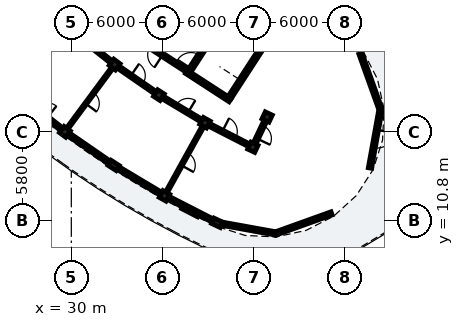
"""IFC4 building model, lengths in metres.
Left out: names, types, materials, properties, quantities, classifications, styles, units other than length and angle.
Written with IfcOpenShell. Run it as: python <this file> out.ifc"""

import sys

from ifc_helpers import new_model, si_unit, direction, frame, frame_2d, origin, origin_2d, place, context, subcontext, project, spatial, rectangle, extrude, element, fill, save


model = new_model("IFC4")
c1 = context("Model", 3, precision=1e-05, world=origin(), true_north=direction((0.0, 1.0)))
c2 = subcontext(c1, "Body", "Model", "MODEL_VIEW")
j1 = project(units=[si_unit("LENGTHUNIT", "METRE"), si_unit("PLANEANGLEUNIT", "RADIAN")], contexts=[c1])
p1 = place(None, origin())
s1 = spatial("IfcSite", under=j1, at=p1, CompositionType="ELEMENT")
p2 = place(p1, origin())
s2 = spatial("IfcBuilding", under=s1, at=p2, CompositionType="ELEMENT")
p3 = place(p2, frame((0.0, 0.0, 35.72)))
s3 = spatial("IfcBuildingStorey", under=s2, at=p3, CompositionType="ELEMENT", Elevation=35.72)
p4 = place(p3, frame((40.413, 18.882, 0.0), z_axis=(0.0, 0.0, 1.0), x_axis=(0.544629435258, 0.838676802022, 0.0)))
e1 = element("IfcWall", 1, at=p4, inside=s3, PredefinedType="SHEAR", context=c2, shape_type="SweptSolid", body=[
    extrude(rectangle(XDim=6.6, YDim=0.25, at=frame_2d((3.3, 0.0))), origin(), (0.0, 0.0, 1.0), 3.11),
])
p5 = place(p3, frame((40.449, 18.709, 0.0), z_axis=(0.0, 0.0, 1.0), x_axis=(-0.838678407117, 0.544626963559, 0.0)))
e2 = element("IfcWall", 2, at=p5, inside=s3, PredefinedType="SHEAR", context=c2, shape_type="SweptSolid", body=[
    extrude(rectangle(XDim=3.42, YDim=0.25, at=frame_2d((1.71, 0.0))), origin(), (0.0, 0.0, 1.0), 3.11),
])
p6 = place(p3, frame((37.754, 20.608, 0.0), z_axis=(0.0, 0.0, 1.0), x_axis=(0.544655453679, 0.838659905312, 0.0)))
e3 = element("IfcWall", 3, at=p6, inside=s3, PredefinedType="SHEAR", context=c2, shape_type="SweptSolid", body=[
    extrude(rectangle(XDim=6.6, YDim=0.25, at=frame_2d((3.3, 0.0))), origin(), (0.0, 0.0, 1.0), 3.11),
])
p7 = place(p6, frame((0.22, 0.0, 0.0)))
e4 = element("IfcOpeningElement", 4, at=p7, cuts=e3, PredefinedType="OPENING", context=c2, shape_type="SweptSolid", body=[
    extrude(rectangle(XDim=1.05, YDim=2.15, at=frame_2d((0.525, 1.075))), frame((0.0, 0.135, 0.0), z_axis=(0.0, -1.0, 0.0), x_axis=(1.0, 0.0, 0.0)), (0.0, 0.0, 1.0), 0.27),
])
for number, where, z_axis, x_axis in (
    (5, (32.85, 21.052, 0.0), (0.0, 0.0, 1.0), (-0.595, -0.804, 0.0)),
    (6, (29.578, 16.63, 0.0), (0.0, 0.0, 1.0), (-0.595, -0.804, 0.0)),
    (7, (35.76, 19.042, 0.0), (0.0, 0.0, 1.0), (-0.541, -0.841, 0.0)),
):
    element("IfcColumn", number, at=place(p3, frame(where, z_axis=z_axis, x_axis=x_axis)), inside=s3, PredefinedType="COLUMN", context=c2, shape_type="SweptSolid", body=[
        extrude(rectangle(XDim=0.51, YDim=0.51, at=origin_2d()), origin(), (0.0, 0.0, 1.0), 3.125),
    ])
p8 = place(p3, frame((32.785, 14.416, 0.0), z_axis=(0.0, 0.0, 1.0), x_axis=(-0.540974471368, -0.841039012964, 0.0)))
e8 = element("IfcColumn", 8, at=p8, inside=s3, PredefinedType="PILASTER", context=c2, shape_type="SweptSolid", body=[
    extrude(rectangle(XDim=0.39, YDim=0.63, at=origin_2d()), origin(), (0.0, 0.0, 1.0), 3.125),
])
for number, where, z_axis, x_axis in (
    (9, (38.796, 17.227, 0.0), (0.0, 0.0, 1.0), (-0.485, -0.875, 0.0)),
    (10, (36.13, 12.417, 0.0), (0.0, 0.0, 1.0), (-0.485, -0.875, 0.0)),
    (11, (42.882, 17.604, 0.0), (0.0, 0.0, 1.0), (-0.427, -0.904, 0.0)),
    (12, (41.944, 15.614, 0.0), (0.0, 0.0, 1.0), (-0.427, -0.904, 0.0)),
):
    element("IfcColumn", number, at=place(p3, frame(where, z_axis=z_axis, x_axis=x_axis)), inside=s3, PredefinedType="COLUMN", context=c2, shape_type="SweptSolid", body=[
        extrude(rectangle(XDim=0.51, YDim=0.51, at=origin_2d()), origin(), (0.0, 0.0, 1.0), 3.125),
    ])
p9 = place(p3, frame((39.598, 10.64, 0.0), z_axis=(0.0, 0.0, 1.0), x_axis=(-0.426568739901, -0.904455145454, 0.0)))
e13 = element("IfcColumn", 13, at=p9, inside=s3, PredefinedType="PILASTER", context=c2, shape_type="SweptSolid", body=[
    extrude(rectangle(XDim=0.39, YDim=0.63, at=origin_2d()), origin(), (0.0, 0.0, 1.0), 3.125),
])
p10 = place(p3, frame((26.653, 18.947, 0.0), z_axis=(0.0, 0.0, 1.0), x_axis=(0.783976646649, -0.620790316861, 0.0)))
e14 = element("IfcWall", 14, at=p10, inside=s3, PredefinedType="SOLIDWALL", context=c2, shape_type="SweptSolid", body=[
    extrude(rectangle(XDim=3.507, YDim=0.22, at=frame_2d((1.753, 0.0))), origin(), (0.0, 0.0, 1.0), 2.355),
])
p11 = place(p10, frame((1.263, 0.0, 0.0)))
e15 = element("IfcOpeningElement", 15, at=p11, cuts=e14, PredefinedType="OPENING", context=c2, shape_type="SweptSolid", body=[
    extrude(rectangle(XDim=0.98, YDim=2.12, at=frame_2d((0.49, 1.06))), frame((0.0, 0.12, 0.0), z_axis=(0.0, -1.0, 0.0), x_axis=(1.0, 0.0, 0.0)), (0.0, 0.0, 1.0), 0.24),
])
p12 = place(p3, frame((29.763, 16.502, 0.0), z_axis=(0.0, 0.0, 1.0), x_axis=(0.822878299875, -0.568217655125, 0.0)))
e16 = element("IfcWall", 16, at=p12, inside=s3, PredefinedType="SOLIDWALL", context=c2, shape_type="SweptSolid", body=[
    extrude(rectangle(XDim=3.507, YDim=0.22, at=frame_2d((1.753, 0.0))), origin(), (0.0, 0.0, 1.0), 2.355),
])
p13 = place(p12, frame((1.213, 0.0, 0.55)))
e17 = element("IfcOpeningElement", 17, at=p13, cuts=e16, PredefinedType="OPENING", context=c2, shape_type="SweptSolid", body=[
    extrude(rectangle(XDim=1.08, YDim=1.45, at=frame_2d((0.54, 0.725))), frame((0.0, 0.12, 0.0), z_axis=(0.0, -1.0, 0.0), x_axis=(1.0, 0.0, 0.0)), (0.0, 0.0, 1.0), 0.24),
])
p14 = place(p3, frame((32.927, 14.332, 0.0), z_axis=(0.0, 0.0, 1.0), x_axis=(0.858272027283, -0.513195018666, 0.0)))
e18 = element("IfcWall", 18, at=p14, inside=s3, PredefinedType="SOLIDWALL", context=c2, shape_type="SweptSolid", body=[
    extrude(rectangle(XDim=3.507, YDim=0.22, at=frame_2d((1.753, 0.0))), origin(), (0.0, 0.0, 1.0), 2.355),
])
p15 = place(p14, frame((1.063, 0.0, 0.55)))
e19 = element("IfcOpeningElement", 19, at=p15, cuts=e18, PredefinedType="OPENING", context=c2, shape_type="SweptSolid", body=[
    extrude(rectangle(XDim=1.38, YDim=1.56, at=frame_2d((0.69, 0.78))), frame((0.0, 0.12, 0.0), z_axis=(0.0, -1.0, 0.0), x_axis=(1.0, 0.0, 0.0)), (0.0, 0.0, 1.0), 0.24),
])
p16 = place(p3, frame((36.33, 12.314, 0.0), z_axis=(0.0, 0.0, 1.0), x_axis=(0.890012358945, -0.455936400088, 0.0)))
e20 = element("IfcWall", 20, at=p16, inside=s3, PredefinedType="SOLIDWALL", context=c2, shape_type="SweptSolid", body=[
    extrude(rectangle(XDim=3.507, YDim=0.22, at=frame_2d((1.753, 0.0))), origin(), (0.0, 0.0, 1.0), 2.355),
])
p17 = place(p16, frame((1.173, 0.0, 0.55)))
e21 = element("IfcOpeningElement", 21, at=p17, cuts=e20, PredefinedType="OPENING", context=c2, shape_type="SweptSolid", body=[
    extrude(rectangle(XDim=1.16, YDim=1.485, at=frame_2d((0.58, 0.743))), frame((0.0, 0.12, 0.0), z_axis=(0.0, -1.0, 0.0), x_axis=(1.0, 0.0, 0.0)), (0.0, 0.0, 1.0), 0.24),
])
p18 = place(p3, frame((49.022, 21.772, 0.0), z_axis=(0.0, 0.0, 1.0), x_axis=(0.337903065186, -0.941180917007, 0.0)))
e22 = element("IfcWall", 22, at=p18, inside=s3, PredefinedType="SOLIDWALL", context=c2, shape_type="SweptSolid", body=[
    extrude(rectangle(XDim=3.908, YDim=0.22, at=frame_2d((1.954, 0.0))), origin(), (0.0, 0.0, 1.0), 2.355),
])
p19 = place(p18, frame((1.029, 0.0, 0.4)))
e23 = element("IfcOpeningElement", 23, at=p19, cuts=e22, PredefinedType="OPENING", context=c2, shape_type="SweptSolid", body=[
    extrude(rectangle(XDim=1.85, YDim=1.72, at=frame_2d((0.925, 0.86))), frame((0.0, 0.12, 0.0), z_axis=(0.0, -1.0, 0.0), x_axis=(1.0, 0.0, 0.0)), (0.0, 0.0, 1.0), 0.24),
])
p20 = place(p3, frame((50.343, 18.094, 0.0), z_axis=(0.0, 0.0, 1.0), x_axis=(-0.177978291347, -0.984034413935, 0.0)))
e24 = element("IfcWall", 24, at=p20, inside=s3, PredefinedType="SOLIDWALL", context=c2, shape_type="SweptSolid", body=[
    extrude(rectangle(XDim=3.908, YDim=0.22, at=frame_2d((1.954, 0.0))), origin(), (0.0, 0.0, 1.0), 2.355),
])
p21 = place(p20, frame((1.354, 0.0, 0.0)))
e25 = element("IfcOpeningElement", 25, at=p21, cuts=e24, PredefinedType="OPENING", context=c2, shape_type="SweptSolid", body=[
    extrude(rectangle(XDim=1.2, YDim=2.15, at=frame_2d((0.6, 1.075))), frame((0.0, 0.12, 0.0), z_axis=(0.0, -1.0, 0.0), x_axis=(1.0, 0.0, 0.0)), (0.0, 0.0, 1.0), 0.24),
])
p22 = place(p3, frame((47.122, 11.265, 0.0), z_axis=(0.0, 0.0, 1.0), x_axis=(-0.941180917007, -0.337903065186, 0.0)))
e26 = element("IfcWall", 26, at=p22, inside=s3, PredefinedType="SOLIDWALL", context=c2, shape_type="SweptSolid", body=[
    extrude(rectangle(XDim=3.908, YDim=0.22, at=frame_2d((1.954, 0.0))), origin(), (0.0, 0.0, 1.0), 2.355),
])
p23 = place(p22, frame((1.029, 0.0, 0.4)))
e27 = element("IfcOpeningElement", 27, at=p23, cuts=e26, PredefinedType="OPENING", context=c2, shape_type="SweptSolid", body=[
    extrude(rectangle(XDim=1.85, YDim=1.72, at=frame_2d((0.925, 0.86))), frame((0.0, 0.12, 0.0), z_axis=(0.0, -1.0, 0.0), x_axis=(1.0, 0.0, 0.0)), (0.0, 0.0, 1.0), 0.24),
])
p24 = place(p3, frame((43.444, 9.944, 0.0), z_axis=(0.0, 0.0, 1.0), x_axis=(-0.984045353069, 0.177917798727, 0.0)))
e28 = element("IfcWall", 28, at=p24, inside=s3, PredefinedType="SOLIDWALL", context=c2, shape_type="SweptSolid", body=[
    extrude(rectangle(XDim=3.908, YDim=0.22, at=frame_2d((1.954, 0.0))), origin(), (0.0, 0.0, 1.0), 2.355),
])
p25 = place(p24, frame((0.979, 0.0, 0.4)))
e29 = element("IfcOpeningElement", 29, at=p25, cuts=e28, PredefinedType="OPENING", context=c2, shape_type="SweptSolid", body=[
    extrude(rectangle(XDim=1.95, YDim=1.78, at=frame_2d((0.975, 0.89))), frame((0.0, 0.12, 0.0), z_axis=(0.0, -1.0, 0.0), x_axis=(1.0, 0.0, 0.0)), (0.0, 0.0, 1.0), 0.24),
])
p26 = place(p3, frame((37.639, 20.623, 0.0), z_axis=(0.0, 0.0, 1.0), x_axis=(-0.838681446513, 0.544622283124, 0.0)))
e30 = element("IfcWall", 30, at=p26, inside=s3, PredefinedType="PARTITIONING", context=c2, shape_type="SweptSolid", body=[
    extrude(rectangle(XDim=4.9, YDim=0.22, at=frame_2d((2.45, 0.0))), origin(), (0.0, 0.0, 1.0), 2.34),
])
p27 = place(p26, frame((1.95, 0.0, 0.0)))
e31 = element("IfcOpeningElement", 31, at=p27, cuts=e30, PredefinedType="OPENING", context=c2, shape_type="SweptSolid", body=[
    extrude(rectangle(XDim=0.98, YDim=2.14, at=frame_2d((0.49, 1.07))), frame((0.0, 0.12, 0.0), z_axis=(0.0, -1.0, 0.0), x_axis=(1.0, 0.0, 0.0)), (0.0, 0.0, 1.0), 0.24),
])
p28 = place(p3, frame((30.351, 23.03, 0.0), z_axis=(0.0, 0.0, 1.0), x_axis=(0.783965548427, -0.620804332201, 0.0)))
e32 = element("IfcWall", 32, at=p28, inside=s3, PredefinedType="PARTITIONING", context=c2, shape_type="SweptSolid", body=[
    extrude(rectangle(XDim=2.837, YDim=0.195, at=frame_2d((1.418, 0.0))), origin(), (0.0, 0.0, 1.0), 2.37),
])
p29 = place(p28, frame((0.934, 0.0, 0.0)))
e33 = element("IfcOpeningElement", 33, at=p29, cuts=e32, PredefinedType="OPENING", context=c2, shape_type="SweptSolid", body=[
    extrude(rectangle(XDim=0.97, YDim=2.15, at=frame_2d((0.485, 1.075))), frame((0.0, 0.107, 0.0), z_axis=(0.0, -1.0, 0.0), x_axis=(1.0, 0.0, 0.0)), (0.0, 0.0, 1.0), 0.215),
])
p30 = place(p3, frame((32.612, 20.73, 0.0), z_axis=(0.0, 0.0, 1.0), x_axis=(-0.59482622273, -0.803854318116, 0.0)))
e34 = element("IfcWall", 34, at=p30, inside=s3, PredefinedType="PARTITIONING", context=c2, shape_type="SweptSolid", body=[
    extrude(rectangle(XDim=4.7, YDim=0.125, at=frame_2d((2.35, 0.0))), origin(), (0.0, 0.0, 1.0), 2.37),
])
p31 = place(p30, frame((1.905, 0.0, 0.0)))
e35 = element("IfcOpeningElement", 35, at=p31, cuts=e34, PredefinedType="OPENING", context=c2, shape_type="SweptSolid", body=[
    extrude(rectangle(XDim=0.89, YDim=2.1, at=frame_2d((0.445, 1.05))), frame((0.0, 0.073, 0.0), z_axis=(0.0, -1.0, 0.0), x_axis=(1.0, 0.0, 0.0)), (0.0, 0.0, 1.0), 0.145),
])
p32 = place(p3, frame((33.138, 20.853, 0.0), z_axis=(0.0, 0.0, 1.0), x_axis=(0.822870075235, -0.568229565653, 0.0)))
e36 = element("IfcWall", 36, at=p32, inside=s3, PredefinedType="PARTITIONING", context=c2, shape_type="SweptSolid", body=[
    extrude(rectangle(XDim=2.837, YDim=0.195, at=frame_2d((1.418, 0.0))), origin(), (0.0, 0.0, 1.0), 2.37),
])
p33 = place(p32, frame((0.944, 0.0, 0.0)))
e37 = element("IfcOpeningElement", 37, at=p33, cuts=e36, PredefinedType="OPENING", context=c2, shape_type="SweptSolid", body=[
    extrude(rectangle(XDim=0.95, YDim=2.13, at=frame_2d((0.475, 1.065))), frame((0.0, 0.107, 0.0), z_axis=(0.0, -1.0, 0.0), x_axis=(1.0, 0.0, 0.0)), (0.0, 0.0, 1.0), 0.215),
])
p34 = place(p3, frame((36.061, 18.862, 0.0), z_axis=(0.0, 0.0, 1.0), x_axis=(0.858281647443, -0.51317892948, 0.0)))
e38 = element("IfcWall", 38, at=p34, inside=s3, PredefinedType="PARTITIONING", context=c2, shape_type="SweptSolid", body=[
    extrude(rectangle(XDim=2.837, YDim=0.195, at=frame_2d((1.418, 0.0))), origin(), (0.0, 0.0, 1.0), 2.37),
])
p35 = place(p34, frame((0.954, 0.0, 0.0)))
e39 = element("IfcOpeningElement", 39, at=p35, cuts=e38, PredefinedType="OPENING", context=c2, shape_type="SweptSolid", body=[
    extrude(rectangle(XDim=0.93, YDim=2.12, at=frame_2d((0.465, 1.06))), frame((0.0, 0.107, 0.0), z_axis=(0.0, -1.0, 0.0), x_axis=(1.0, 0.0, 0.0)), (0.0, 0.0, 1.0), 0.215),
])
p36 = place(p3, frame((38.602, 16.877, 0.0), z_axis=(0.0, 0.0, 1.0), x_axis=(-0.484813534336, -0.874617537513, 0.0)))
e40 = element("IfcWall", 40, at=p36, inside=s3, PredefinedType="PARTITIONING", context=c2, shape_type="SweptSolid", body=[
    extrude(rectangle(XDim=4.7, YDim=0.125, at=frame_2d((2.35, 0.0))), origin(), (0.0, 0.0, 1.0), 2.37),
])
p37 = place(p36, frame((1.895, 0.0, 0.0)))
e41 = element("IfcOpeningElement", 41, at=p37, cuts=e40, PredefinedType="OPENING", context=c2, shape_type="SweptSolid", body=[
    extrude(rectangle(XDim=0.91, YDim=2.1, at=frame_2d((0.455, 1.05))), frame((0.0, 0.073, 0.0), z_axis=(0.0, -1.0, 0.0), x_axis=(1.0, 0.0, 0.0)), (0.0, 0.0, 1.0), 0.145),
])
p38 = place(p3, frame((39.107, 17.067, 0.0), z_axis=(0.0, 0.0, 1.0), x_axis=(0.890030590607, -0.45590080915, 0.0)))
e42 = element("IfcWall", 42, at=p38, inside=s3, PredefinedType="PARTITIONING", context=c2, shape_type="SweptSolid", body=[
    extrude(rectangle(XDim=2.837, YDim=0.195, at=frame_2d((1.418, 0.0))), origin(), (0.0, 0.0, 1.0), 2.37),
])
p39 = place(p38, frame((0.924, 0.0, 0.0)))
e43 = element("IfcOpeningElement", 43, at=p39, cuts=e42, PredefinedType="OPENING", context=c2, shape_type="SweptSolid", body=[
    extrude(rectangle(XDim=0.99, YDim=2.16, at=frame_2d((0.495, 1.08))), frame((0.0, 0.107, 0.0), z_axis=(0.0, -1.0, 0.0), x_axis=(1.0, 0.0, 0.0)), (0.0, 0.0, 1.0), 0.215),
])
p40 = place(p3, frame((42.861, 17.559, 0.0), z_axis=(0.0, 0.0, 1.0), x_axis=(-0.426541520305, -0.904467982549, 0.0)))
e44 = element("IfcWall", 44, at=p40, inside=s3, PredefinedType="PARTITIONING", context=c2, shape_type="SweptSolid", body=[
    extrude(rectangle(XDim=2.1, YDim=0.195, at=frame_2d((1.05, 0.0))), origin(), (0.0, 0.0, 1.0), 2.37),
])
p41 = place(p40, frame((0.57, 0.0, 0.0)))
e45 = element("IfcOpeningElement", 45, at=p41, cuts=e44, PredefinedType="OPENING", context=c2, shape_type="SweptSolid", body=[
    extrude(rectangle(XDim=0.95, YDim=2.13, at=frame_2d((0.475, 1.065))), frame((0.0, 0.107, 0.0), z_axis=(0.0, -1.0, 0.0), x_axis=(1.0, 0.0, 0.0)), (0.0, 0.0, 1.0), 0.215),
])
p42 = place(p13, origin())
e46 = element("IfcWindow", 46, at=p42, inside=s3, PartitioningType="SINGLE_PANEL", PredefinedType="WINDOW", context=c2, shape_type="SweptSolid", body=[
    extrude(rectangle(XDim=1.08, YDim=1.45, at=frame_2d((0.54, 0.725))), frame((0.0, 0.03, 0.0), z_axis=(0.0, -1.0, 0.0), x_axis=(1.0, 0.0, 0.0)), (0.0, 0.0, 1.0), 0.06),
])
fill(e17, e46)
p43 = place(p15, origin())
e47 = element("IfcWindow", 47, at=p43, inside=s3, PartitioningType="SINGLE_PANEL", PredefinedType="WINDOW", context=c2, shape_type="SweptSolid", body=[
    extrude(rectangle(XDim=1.38, YDim=1.56, at=frame_2d((0.69, 0.78))), frame((0.0, 0.03, 0.0), z_axis=(0.0, -1.0, 0.0), x_axis=(1.0, 0.0, 0.0)), (0.0, 0.0, 1.0), 0.06),
])
fill(e19, e47)
p44 = place(p17, origin())
e48 = element("IfcWindow", 48, at=p44, inside=s3, PartitioningType="SINGLE_PANEL", PredefinedType="WINDOW", context=c2, shape_type="SweptSolid", body=[
    extrude(rectangle(XDim=1.16, YDim=1.485, at=frame_2d((0.58, 0.743))), frame((0.0, 0.03, 0.0), z_axis=(0.0, -1.0, 0.0), x_axis=(1.0, 0.0, 0.0)), (0.0, 0.0, 1.0), 0.06),
])
fill(e21, e48)
p45 = place(p19, origin())
e49 = element("IfcWindow", 49, at=p45, inside=s3, PartitioningType="SINGLE_PANEL", PredefinedType="WINDOW", context=c2, shape_type="SweptSolid", body=[
    extrude(rectangle(XDim=1.85, YDim=1.72, at=frame_2d((0.925, 0.86))), frame((0.0, 0.03, 0.0), z_axis=(0.0, -1.0, 0.0), x_axis=(1.0, 0.0, 0.0)), (0.0, 0.0, 1.0), 0.06),
])
fill(e23, e49)
p46 = place(p21, origin())
e50 = element("IfcDoor", 50, at=p46, inside=s3, OperationType="SINGLE_SWING_LEFT", PredefinedType="DOOR", context=c2, shape_type="SweptSolid", body=[
    extrude(rectangle(XDim=1.2, YDim=2.15, at=frame_2d((0.6, 1.075))), frame((0.0, 0.025, 0.0), z_axis=(0.0, -1.0, 0.0), x_axis=(1.0, 0.0, 0.0)), (0.0, 0.0, 1.0), 0.05),
])
fill(e25, e50)
p47 = place(p23, origin())
e51 = element("IfcWindow", 51, at=p47, inside=s3, PartitioningType="SINGLE_PANEL", PredefinedType="WINDOW", context=c2, shape_type="SweptSolid", body=[
    extrude(rectangle(XDim=1.85, YDim=1.72, at=frame_2d((0.925, 0.86))), frame((0.0, 0.03, 0.0), z_axis=(0.0, -1.0, 0.0), x_axis=(1.0, 0.0, 0.0)), (0.0, 0.0, 1.0), 0.06),
])
fill(e27, e51)
p48 = place(p25, origin())
e52 = element("IfcWindow", 52, at=p48, inside=s3, PartitioningType="SINGLE_PANEL", PredefinedType="WINDOW", context=c2, shape_type="SweptSolid", body=[
    extrude(rectangle(XDim=1.95, YDim=1.78, at=frame_2d((0.975, 0.89))), frame((0.0, 0.03, 0.0), z_axis=(0.0, -1.0, 0.0), x_axis=(1.0, 0.0, 0.0)), (0.0, 0.0, 1.0), 0.06),
])
fill(e29, e52)
p49 = place(p7, origin())
e53 = element("IfcDoor", 53, at=p49, inside=s3, OperationType="SINGLE_SWING_LEFT", PredefinedType="DOOR", context=c2, shape_type="SweptSolid", body=[
    extrude(rectangle(XDim=1.05, YDim=2.15, at=frame_2d((0.525, 1.075))), frame((0.0, 0.025, 0.0), z_axis=(0.0, -1.0, 0.0), x_axis=(1.0, 0.0, 0.0)), (0.0, 0.0, 1.0), 0.05),
])
fill(e4, e53)
p50 = place(p27, origin())
e54 = element("IfcDoor", 54, at=p50, inside=s3, OperationType="SINGLE_SWING_LEFT", PredefinedType="DOOR", context=c2, shape_type="SweptSolid", body=[
    extrude(rectangle(XDim=0.98, YDim=2.14, at=frame_2d((0.49, 1.07))), frame((0.0, 0.025, 0.0), z_axis=(0.0, -1.0, 0.0), x_axis=(1.0, 0.0, 0.0)), (0.0, 0.0, 1.0), 0.05),
])
fill(e31, e54)
p51 = place(p29, origin())
e55 = element("IfcDoor", 55, at=p51, inside=s3, OperationType="SINGLE_SWING_RIGHT", PredefinedType="DOOR", context=c2, shape_type="SweptSolid", body=[
    extrude(rectangle(XDim=0.97, YDim=2.15, at=frame_2d((0.485, 1.075))), frame((0.0, 0.025, 0.0), z_axis=(0.0, -1.0, 0.0), x_axis=(1.0, 0.0, 0.0)), (0.0, 0.0, 1.0), 0.05),
])
fill(e33, e55)
p52 = place(p31, origin())
e56 = element("IfcDoor", 56, at=p52, inside=s3, OperationType="SINGLE_SWING_RIGHT", PredefinedType="DOOR", context=c2, shape_type="SweptSolid", body=[
    extrude(rectangle(XDim=0.89, YDim=2.1, at=frame_2d((0.445, 1.05))), frame((0.0, 0.025, 0.0), z_axis=(0.0, -1.0, 0.0), x_axis=(1.0, 0.0, 0.0)), (0.0, 0.0, 1.0), 0.05),
])
fill(e35, e56)
p53 = place(p33, origin())
e57 = element("IfcDoor", 57, at=p53, inside=s3, OperationType="SINGLE_SWING_LEFT", PredefinedType="DOOR", context=c2, shape_type="SweptSolid", body=[
    extrude(rectangle(XDim=0.95, YDim=2.13, at=frame_2d((0.475, 1.065))), frame((0.0, 0.025, 0.0), z_axis=(0.0, -1.0, 0.0), x_axis=(1.0, 0.0, 0.0)), (0.0, 0.0, 1.0), 0.05),
])
fill(e37, e57)
p54 = place(p35, origin())
e58 = element("IfcDoor", 58, at=p54, inside=s3, OperationType="SINGLE_SWING_RIGHT", PredefinedType="DOOR", context=c2, shape_type="SweptSolid", body=[
    extrude(rectangle(XDim=0.93, YDim=2.12, at=frame_2d((0.465, 1.06))), frame((0.0, 0.025, 0.0), z_axis=(0.0, -1.0, 0.0), x_axis=(1.0, 0.0, 0.0)), (0.0, 0.0, 1.0), 0.05),
])
fill(e39, e58)
p55 = place(p37, origin())
e59 = element("IfcDoor", 59, at=p55, inside=s3, OperationType="SINGLE_SWING_RIGHT", PredefinedType="DOOR", context=c2, shape_type="SweptSolid", body=[
    extrude(rectangle(XDim=0.91, YDim=2.1, at=frame_2d((0.455, 1.05))), frame((0.0, 0.025, 0.0), z_axis=(0.0, -1.0, 0.0), x_axis=(1.0, 0.0, 0.0)), (0.0, 0.0, 1.0), 0.05),
])
fill(e41, e59)
p56 = place(p39, origin())
e60 = element("IfcDoor", 60, at=p56, inside=s3, OperationType="SINGLE_SWING_LEFT", PredefinedType="DOOR", context=c2, shape_type="SweptSolid", body=[
    extrude(rectangle(XDim=0.99, YDim=2.16, at=frame_2d((0.495, 1.08))), frame((0.0, 0.025, 0.0), z_axis=(0.0, -1.0, 0.0), x_axis=(1.0, 0.0, 0.0)), (0.0, 0.0, 1.0), 0.05),
])
fill(e43, e60)
p57 = place(p41, origin())
e61 = element("IfcDoor", 61, at=p57, inside=s3, OperationType="SINGLE_SWING_RIGHT", PredefinedType="DOOR", context=c2, shape_type="SweptSolid", body=[
    extrude(rectangle(XDim=0.95, YDim=2.13, at=frame_2d((0.475, 1.065))), frame((0.0, 0.025, 0.0), z_axis=(0.0, -1.0, 0.0), x_axis=(1.0, 0.0, 0.0)), (0.0, 0.0, 1.0), 0.05),
])
fill(e45, e61)
save(model, sys.argv[1])
